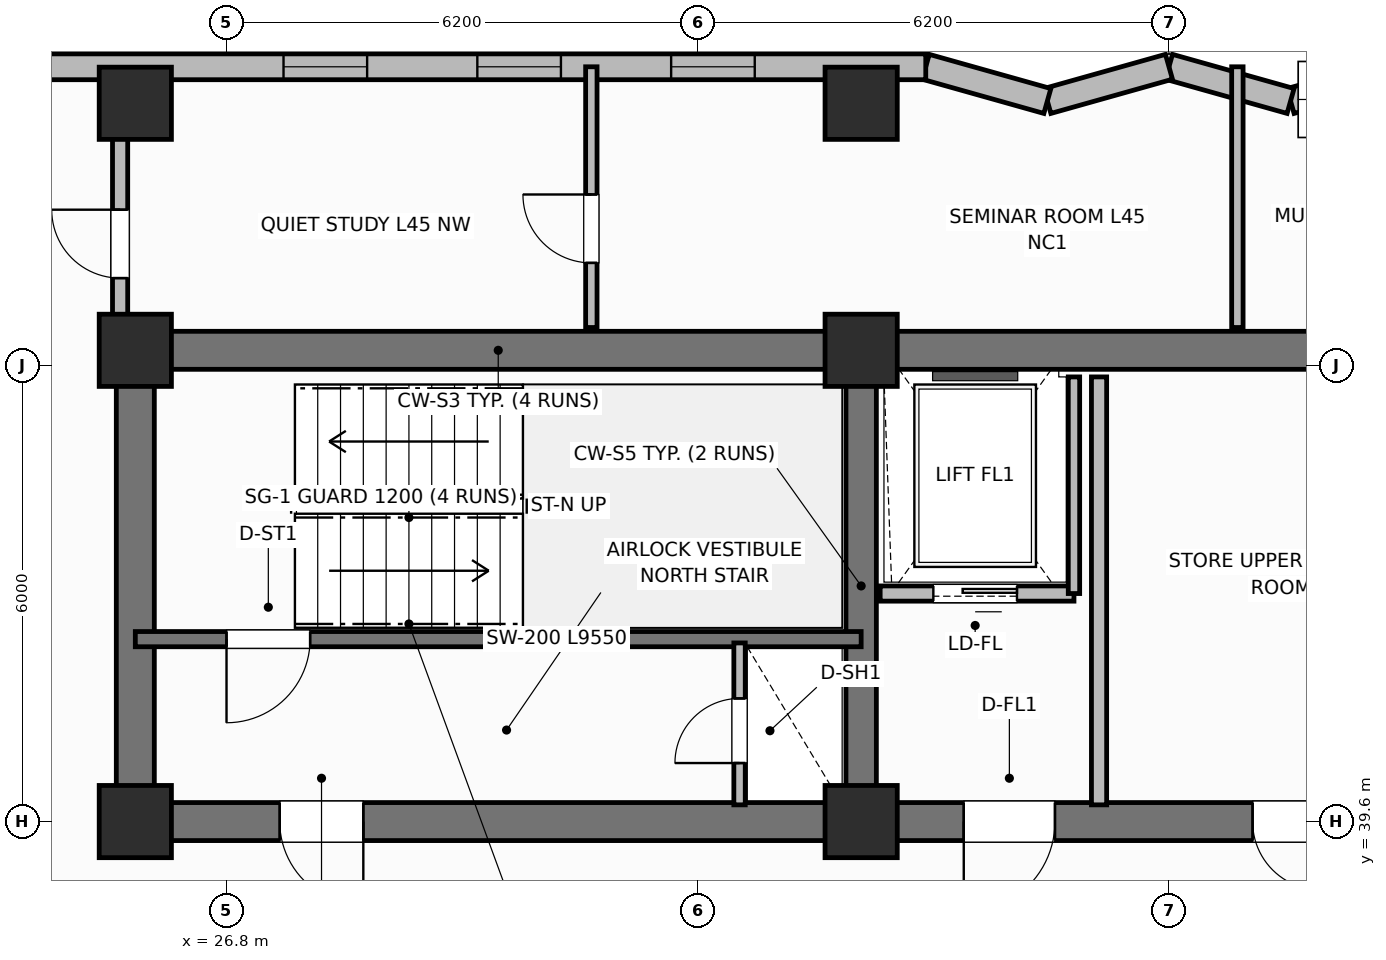
"""IFC4 building model, lengths in metres.
Left out: names, types, materials, properties, quantities, classifications, styles, units other than length and angle.
Written with IfcOpenShell. Run it as: python <this file> out.ifc"""

import sys

from ifc_helpers import new_model, si_unit, direction, frame, frame_2d, origin, origin_2d, place, context, subcontext, project, spatial, rectangle, extrude, element, fill, save


model = new_model("IFC4")
c1 = context("Model", 3, precision=1e-05, world=origin(), true_north=direction((0.0, 1.0)))
c2 = subcontext(c1, "Body", "Model", "MODEL_VIEW")
j1 = project(units=[si_unit("LENGTHUNIT", "METRE"), si_unit("PLANEANGLEUNIT", "RADIAN")], contexts=[c1])
p1 = place(None, origin())
s1 = spatial("IfcSite", under=j1, at=p1, CompositionType="ELEMENT")
p2 = place(p1, origin())
s2 = spatial("IfcBuilding", under=s1, at=p2, CompositionType="ELEMENT")
p3 = place(p2, frame((0.0, 0.0, 181.1)))
s3 = spatial("IfcBuildingStorey", under=s2, at=p3, CompositionType="ELEMENT", Elevation=181.1)
p4 = place(p3, frame((25.6, 45.8, 0.0), z_axis=(0.0, 0.0, 1.0), x_axis=(1.0, 0.0, 0.0)))
e1 = element("IfcWall", 1, at=p4, inside=s3, PredefinedType="SHEAR", context=c2, shape_type="SweptSolid", body=[
    extrude(rectangle(XDim=27.2, YDim=0.5, at=frame_2d((13.6, 0.0))), origin(), (0.0, 0.0, 1.0), 3.7),
])
p5 = place(p3, frame((25.6, 39.85, 0.0), z_axis=(0.0, 0.0, 1.0), x_axis=(0.0, 1.0, 0.0)))
e2 = element("IfcWall", 2, at=p5, inside=s3, PredefinedType="SHEAR", context=c2, shape_type="SweptSolid", body=[
    extrude(rectangle(XDim=5.7, YDim=0.5, at=frame_2d((2.85, 0.0))), origin(), (0.0, 0.0, 1.0), 3.7),
])
p6 = place(p3, frame((52.8, 39.6, 0.0), z_axis=(0.0, 0.0, 1.0), x_axis=(-1.0, 0.0, 0.0)))
e3 = element("IfcWall", 3, at=p6, inside=s3, PredefinedType="SHEAR", context=c2, shape_type="SweptSolid", body=[
    extrude(rectangle(XDim=27.2, YDim=0.5, at=frame_2d((13.6, 0.0))), origin(), (0.0, 0.0, 1.0), 3.7),
])
p7 = place(p6, frame((24.2, 0.0, 0.0)))
e4 = element("IfcOpeningElement", 4, at=p7, cuts=e3, PredefinedType="OPENING", context=c2, shape_type="SweptSolid", body=[
    extrude(rectangle(XDim=1.1, YDim=2.15, at=frame_2d((0.55, 1.075))), frame((0.0, 0.26, 0.0), z_axis=(0.0, -1.0, 0.0), x_axis=(1.0, 0.0, 0.0)), (0.0, 0.0, 1.0), 0.52),
])
p8 = place(p6, frame((15.1, 0.0, 0.0)))
e5 = element("IfcOpeningElement", 5, at=p8, cuts=e3, PredefinedType="OPENING", context=c2, shape_type="SweptSolid", body=[
    extrude(rectangle(XDim=1.2, YDim=2.15, at=frame_2d((0.6, 1.075))), frame((0.0, 0.26, 0.0), z_axis=(0.0, -1.0, 0.0), x_axis=(1.0, 0.0, 0.0)), (0.0, 0.0, 1.0), 0.52),
])
p9 = place(p6, frame((11.6, 0.0, 0.0)))
e6 = element("IfcOpeningElement", 6, at=p9, cuts=e3, PredefinedType="OPENING", context=c2, shape_type="SweptSolid", body=[
    extrude(rectangle(XDim=0.9, YDim=2.1, at=frame_2d((0.45, 1.05))), frame((0.0, 0.26, 0.0), z_axis=(0.0, -1.0, 0.0), x_axis=(1.0, 0.0, 0.0)), (0.0, 0.0, 1.0), 0.52),
])
p10 = place(p6, frame((7.35, 0.0, 0.0)))
e7 = element("IfcOpeningElement", 7, at=p10, cuts=e3, PredefinedType="OPENING", context=c2, shape_type="SweptSolid", body=[
    extrude(rectangle(XDim=0.85, YDim=2.1, at=frame_2d((0.425, 1.05))), frame((0.0, 0.26, 0.0), z_axis=(0.0, -1.0, 0.0), x_axis=(1.0, 0.0, 0.0)), (0.0, 0.0, 1.0), 0.52),
])
p11 = place(p6, frame((3.6, 0.0, 0.0)))
e8 = element("IfcOpeningElement", 8, at=p11, cuts=e3, PredefinedType="OPENING", context=c2, shape_type="SweptSolid", body=[
    extrude(rectangle(XDim=1.0, YDim=2.15, at=frame_2d((0.5, 1.075))), frame((0.0, 0.26, 0.0), z_axis=(0.0, -1.0, 0.0), x_axis=(1.0, 0.0, 0.0)), (0.0, 0.0, 1.0), 0.52),
])
p12 = place(p3, frame((35.15, 39.85, 0.0), z_axis=(0.0, 0.0, 1.0), x_axis=(0.0, 1.0, 0.0)))
e9 = element("IfcWall", 9, at=p12, inside=s3, PredefinedType="SHEAR", context=c2, shape_type="SweptSolid", body=[
    extrude(rectangle(XDim=5.7, YDim=0.4, at=frame_2d((2.85, 0.0))), origin(), (0.0, 0.0, 1.0), 3.7),
])
for number, where, z_axis, x_axis in (
    (10, (25.6, 39.6, 0.0), (0.0, 0.0, 1.0), (1.0, 0.0, 0.0)),
    (11, (25.6, 45.8, 0.0), (0.0, 0.0, 1.0), (1.0, 0.0, 0.0)),
    (12, (35.15, 39.6, 0.0), (0.0, 0.0, 1.0), (1.0, 0.0, 0.0)),
    (13, (35.15, 45.8, 0.0), (0.0, 0.0, 1.0), (1.0, 0.0, 0.0)),
    (14, (25.6, 49.05, 0.0), (0.0, 0.0, 1.0), (1.0, 0.0, 0.0)),
    (15, (35.15, 49.05, 0.0), (0.0, 0.0, 1.0), (1.0, 0.0, 0.0)),
):
    element("IfcColumn", number, at=place(p3, frame(where, z_axis=z_axis, x_axis=x_axis)), inside=s3, PredefinedType="COLUMN", context=c2, shape_type="SweptSolid", body=[
        extrude(rectangle(XDim=0.95, YDim=0.95, at=origin_2d()), origin(), (0.0, 0.0, 1.0), 3.7),
    ])
p13 = place(p3, frame((42.4, 49.53, 0.0), z_axis=(0.0, 0.0, 1.0), x_axis=(-0.962652136636, -0.270741322725, 0.0)))
e16 = element("IfcWall", 16, at=p13, inside=s3, PredefinedType="SOLIDWALL", context=c2, shape_type="SweptSolid", body=[
    extrude(rectangle(XDim=1.662, YDim=0.34, at=frame_2d((0.831, 0.0))), origin(), (0.0, 0.0, 1.0), 2.72),
])
p14 = place(p3, frame((40.8, 49.08, 0.0), z_axis=(0.0, 0.0, 1.0), x_axis=(-0.962662902433, 0.270703040766, 0.0)))
e17 = element("IfcWall", 17, at=p14, inside=s3, PredefinedType="SOLIDWALL", context=c2, shape_type="SweptSolid", body=[
    extrude(rectangle(XDim=1.662, YDim=0.34, at=frame_2d((0.831, 0.0))), origin(), (0.0, 0.0, 1.0), 2.72),
])
p15 = place(p3, frame((39.2, 49.53, 0.0), z_axis=(0.0, 0.0, 1.0), x_axis=(-0.962652136636, -0.270741322725, 0.0)))
e18 = element("IfcWall", 18, at=p15, inside=s3, PredefinedType="SOLIDWALL", context=c2, shape_type="SweptSolid", body=[
    extrude(rectangle(XDim=1.662, YDim=0.34, at=frame_2d((0.831, 0.0))), origin(), (0.0, 0.0, 1.0), 2.72),
])
p16 = place(p3, frame((37.6, 49.08, 0.0), z_axis=(0.0, 0.0, 1.0), x_axis=(-0.962662902433, 0.270703040766, 0.0)))
e19 = element("IfcWall", 19, at=p16, inside=s3, PredefinedType="SOLIDWALL", context=c2, shape_type="SweptSolid", body=[
    extrude(rectangle(XDim=1.662, YDim=0.34, at=frame_2d((0.831, 0.0))), origin(), (0.0, 0.0, 1.0), 2.72),
])
p17 = place(p3, frame((36.0, 49.53, 0.0), z_axis=(0.0, 0.0, 1.0), x_axis=(-1.0, 0.0, 0.0)))
e20 = element("IfcWall", 20, at=p17, inside=s3, PredefinedType="SOLIDWALL", context=c2, shape_type="SweptSolid", body=[
    extrude(rectangle(XDim=15.8, YDim=0.34, at=frame_2d((7.9, 0.0))), origin(), (0.0, 0.0, 1.0), 2.72),
])
p18 = place(p17, frame((2.25, 0.0, 0.95)))
e21 = element("IfcOpeningElement", 21, at=p18, cuts=e20, PredefinedType="OPENING", context=c2, shape_type="SweptSolid", body=[
    extrude(rectangle(XDim=1.1, YDim=1.65, at=frame_2d((0.55, 0.825))), frame((0.0, 0.18, 0.0), z_axis=(0.0, -1.0, 0.0), x_axis=(1.0, 0.0, 0.0)), (0.0, 0.0, 1.0), 0.36),
])
p19 = place(p17, frame((4.8, 0.0, 0.95)))
e22 = element("IfcOpeningElement", 22, at=p19, cuts=e20, PredefinedType="OPENING", context=c2, shape_type="SweptSolid", body=[
    extrude(rectangle(XDim=1.1, YDim=1.65, at=frame_2d((0.55, 0.825))), frame((0.0, 0.18, 0.0), z_axis=(0.0, -1.0, 0.0), x_axis=(1.0, 0.0, 0.0)), (0.0, 0.0, 1.0), 0.36),
])
p20 = place(p17, frame((7.35, 0.0, 0.95)))
e23 = element("IfcOpeningElement", 23, at=p20, cuts=e20, PredefinedType="OPENING", context=c2, shape_type="SweptSolid", body=[
    extrude(rectangle(XDim=1.1, YDim=1.65, at=frame_2d((0.55, 0.825))), frame((0.0, 0.18, 0.0), z_axis=(0.0, -1.0, 0.0), x_axis=(1.0, 0.0, 0.0)), (0.0, 0.0, 1.0), 0.36),
])
p21 = place(p17, frame((13.85, 0.0, 0.95)))
e24 = element("IfcOpeningElement", 24, at=p21, cuts=e20, PredefinedType="OPENING", context=c2, shape_type="SweptSolid", body=[
    extrude(rectangle(XDim=1.1, YDim=1.65, at=frame_2d((0.55, 0.825))), frame((0.0, 0.18, 0.0), z_axis=(0.0, -1.0, 0.0), x_axis=(1.0, 0.0, 0.0)), (0.0, 0.0, 1.0), 0.36),
])
p22 = place(p3, frame((35.15, 42.0, 0.0), z_axis=(0.0, 0.0, 1.0), x_axis=(-1.0, 0.0, 0.0)))
e25 = element("IfcWall", 25, at=p22, inside=s3, PredefinedType="SHEAR", context=c2, shape_type="SweptSolid", body=[
    extrude(rectangle(XDim=9.55, YDim=0.2, at=frame_2d((4.775, 0.0))), origin(), (0.0, 0.0, 1.0), 3.7),
])
p23 = place(p22, frame((7.25, 0.0, 0.0)))
e26 = element("IfcOpeningElement", 26, at=p23, cuts=e25, PredefinedType="OPENING", context=c2, shape_type="SweptSolid", body=[
    extrude(rectangle(XDim=1.1, YDim=2.15, at=frame_2d((0.55, 1.075))), frame((0.0, 0.11, 0.0), z_axis=(0.0, -1.0, 0.0), x_axis=(1.0, 0.0, 0.0)), (0.0, 0.0, 1.0), 0.22),
])
p24 = place(p3, frame((33.55, 39.82, 0.0), z_axis=(0.0, 0.0, 1.0), x_axis=(0.0, 1.0, 0.0)))
e27 = element("IfcWall", 27, at=p24, inside=s3, PredefinedType="PARTITIONING", context=c2, shape_type="SweptSolid", body=[
    extrude(rectangle(XDim=2.13, YDim=0.15, at=frame_2d((1.065, 0.0))), origin(), (0.0, 0.0, 1.0), 2.55),
])
p25 = place(p24, frame((0.55, 0.0, 0.0)))
e28 = element("IfcOpeningElement", 28, at=p25, cuts=e27, PredefinedType="OPENING", context=c2, shape_type="SweptSolid", body=[
    extrude(rectangle(XDim=0.85, YDim=2.05, at=frame_2d((0.425, 1.025))), frame((0.0, 0.085, 0.0), z_axis=(0.0, -1.0, 0.0), x_axis=(1.0, 0.0, 0.0)), (0.0, 0.0, 1.0), 0.17),
])
p26 = place(p3, frame((37.95, 42.6, 0.0), z_axis=(0.0, 0.0, 1.0), x_axis=(-1.0, 0.0, 0.0)))
e29 = element("IfcWall", 29, at=p26, inside=s3, PredefinedType="PARTITIONING", context=c2, shape_type="SweptSolid", body=[
    extrude(rectangle(XDim=2.55, YDim=0.2, at=frame_2d((1.275, 0.0))), origin(), (0.0, 0.0, 1.0), 2.32),
])
p27 = place(p26, frame((0.75, 0.0, 0.0)))
e30 = element("IfcOpeningElement", 30, at=p27, cuts=e29, PredefinedType="OPENING", context=c2, shape_type="SweptSolid", body=[
    extrude(rectangle(XDim=1.1, YDim=2.15, at=frame_2d((0.55, 1.075))), frame((0.0, 0.11, 0.0), z_axis=(0.0, -1.0, 0.0), x_axis=(1.0, 0.0, 0.0)), (0.0, 0.0, 1.0), 0.22),
])
p28 = place(p3, frame((37.95, 42.6, 0.0), z_axis=(0.0, 0.0, 1.0), x_axis=(0.0, 1.0, 0.0)))
e31 = element("IfcWall", 31, at=p28, inside=s3, PredefinedType="PARTITIONING", context=c2, shape_type="SweptSolid", body=[
    extrude(rectangle(XDim=2.85, YDim=0.15, at=frame_2d((1.425, 0.0))), origin(), (0.0, 0.0, 1.0), 2.55),
])
p29 = place(p3, frame((38.28, 39.82, 0.0), z_axis=(0.0, 0.0, 1.0), x_axis=(0.0, 1.0, 0.0)))
e32 = element("IfcWall", 32, at=p29, inside=s3, PredefinedType="PARTITIONING", context=c2, shape_type="SweptSolid", body=[
    extrude(rectangle(XDim=5.63, YDim=0.2, at=frame_2d((2.815, 0.0))), origin(), (0.0, 0.0, 1.0), 2.55),
])
p30 = place(p3, frame((31.6, 46.1, 0.0), z_axis=(0.0, 0.0, 1.0), x_axis=(0.0, 1.0, 0.0)))
e33 = element("IfcWall", 33, at=p30, inside=s3, PredefinedType="PARTITIONING", context=c2, shape_type="SweptSolid", body=[
    extrude(rectangle(XDim=3.43, YDim=0.15, at=frame_2d((1.715, 0.0))), origin(), (0.0, 0.0, 1.0), 2.55),
])
p31 = place(p30, frame((0.85, 0.0, 0.0)))
e34 = element("IfcOpeningElement", 34, at=p31, cuts=e33, PredefinedType="OPENING", context=c2, shape_type="SweptSolid", body=[
    extrude(rectangle(XDim=0.9, YDim=2.1, at=frame_2d((0.45, 1.05))), frame((0.0, 0.085, 0.0), z_axis=(0.0, -1.0, 0.0), x_axis=(1.0, 0.0, 0.0)), (0.0, 0.0, 1.0), 0.17),
])
p32 = place(p3, frame((40.1, 46.1, 0.0), z_axis=(0.0, 0.0, 1.0), x_axis=(0.0, 1.0, 0.0)))
e35 = element("IfcWall", 35, at=p32, inside=s3, PredefinedType="PARTITIONING", context=c2, shape_type="SweptSolid", body=[
    extrude(rectangle(XDim=3.43, YDim=0.15, at=frame_2d((1.715, 0.0))), origin(), (0.0, 0.0, 1.0), 2.55),
])
p33 = place(p3, frame((25.4, 46.1, 0.0), z_axis=(0.0, 0.0, 1.0), x_axis=(0.0, 1.0, 0.0)))
e36 = element("IfcWall", 36, at=p33, inside=s3, PredefinedType="PARTITIONING", context=c2, shape_type="SweptSolid", body=[
    extrude(rectangle(XDim=2.68, YDim=0.2, at=frame_2d((1.34, 0.0))), origin(), (0.0, 0.0, 1.0), 2.55),
])
p34 = place(p33, frame((0.65, 0.0, 0.0)))
e37 = element("IfcOpeningElement", 37, at=p34, cuts=e36, PredefinedType="OPENING", context=c2, shape_type="SweptSolid", body=[
    extrude(rectangle(XDim=0.9, YDim=2.1, at=frame_2d((0.45, 1.05))), frame((0.0, 0.11, 0.0), z_axis=(0.0, -1.0, 0.0), x_axis=(1.0, 0.0, 0.0)), (0.0, 0.0, 1.0), 0.22),
])
p35 = place(p18, origin())
e38 = element("IfcWindow", 38, at=p35, inside=s3, PartitioningType="SINGLE_PANEL", PredefinedType="WINDOW", context=c2, shape_type="SweptSolid", body=[
    extrude(rectangle(XDim=1.1, YDim=1.65, at=frame_2d((0.55, 0.825))), frame((0.0, 0.03, 0.0), z_axis=(0.0, -1.0, 0.0), x_axis=(1.0, 0.0, 0.0)), (0.0, 0.0, 1.0), 0.06),
])
fill(e21, e38)
p36 = place(p19, origin())
e39 = element("IfcWindow", 39, at=p36, inside=s3, PartitioningType="SINGLE_PANEL", PredefinedType="WINDOW", context=c2, shape_type="SweptSolid", body=[
    extrude(rectangle(XDim=1.1, YDim=1.65, at=frame_2d((0.55, 0.825))), frame((0.0, 0.03, 0.0), z_axis=(0.0, -1.0, 0.0), x_axis=(1.0, 0.0, 0.0)), (0.0, 0.0, 1.0), 0.06),
])
fill(e22, e39)
p37 = place(p20, origin())
e40 = element("IfcWindow", 40, at=p37, inside=s3, PartitioningType="SINGLE_PANEL", PredefinedType="WINDOW", context=c2, shape_type="SweptSolid", body=[
    extrude(rectangle(XDim=1.1, YDim=1.65, at=frame_2d((0.55, 0.825))), frame((0.0, 0.03, 0.0), z_axis=(0.0, -1.0, 0.0), x_axis=(1.0, 0.0, 0.0)), (0.0, 0.0, 1.0), 0.06),
])
fill(e23, e40)
p38 = place(p23, origin())
e41 = element("IfcDoor", 41, at=p38, inside=s3, OperationType="SINGLE_SWING_RIGHT", PredefinedType="DOOR", context=c2, shape_type="SweptSolid", body=[
    extrude(rectangle(XDim=1.1, YDim=2.15, at=frame_2d((0.55, 1.075))), frame((0.0, 0.025, 0.0), z_axis=(0.0, -1.0, 0.0), x_axis=(1.0, 0.0, 0.0)), (0.0, 0.0, 1.0), 0.05),
])
fill(e26, e41)
p39 = place(p25, origin())
e42 = element("IfcDoor", 42, at=p39, inside=s3, OperationType="SINGLE_SWING_LEFT", PredefinedType="TRAPDOOR", context=c2, shape_type="SweptSolid", body=[
    extrude(rectangle(XDim=0.85, YDim=2.05, at=frame_2d((0.425, 1.025))), frame((0.0, 0.025, 0.0), z_axis=(0.0, -1.0, 0.0), x_axis=(1.0, 0.0, 0.0)), (0.0, 0.0, 1.0), 0.05),
])
fill(e28, e42)
p40 = place(p27, origin())
e43 = element("IfcDoor", 43, at=p40, inside=s3, OperationType="SLIDING_TO_LEFT", PredefinedType="DOOR", context=c2, shape_type="SweptSolid", body=[
    extrude(rectangle(XDim=1.1, YDim=2.15, at=frame_2d((0.55, 1.075))), frame((0.0, 0.025, 0.0), z_axis=(0.0, -1.0, 0.0), x_axis=(1.0, 0.0, 0.0)), (0.0, 0.0, 1.0), 0.05),
])
fill(e30, e43)
p41 = place(p31, origin())
e44 = element("IfcDoor", 44, at=p41, inside=s3, OperationType="SINGLE_SWING_RIGHT", PredefinedType="DOOR", context=c2, shape_type="SweptSolid", body=[
    extrude(rectangle(XDim=0.9, YDim=2.1, at=frame_2d((0.45, 1.05))), frame((0.0, 0.025, 0.0), z_axis=(0.0, -1.0, 0.0), x_axis=(1.0, 0.0, 0.0)), (0.0, 0.0, 1.0), 0.05),
])
fill(e34, e44)
p42 = place(p34, origin())
e45 = element("IfcDoor", 45, at=p42, inside=s3, OperationType="SINGLE_SWING_RIGHT", PredefinedType="DOOR", context=c2, shape_type="SweptSolid", body=[
    extrude(rectangle(XDim=0.9, YDim=2.1, at=frame_2d((0.45, 1.05))), frame((0.0, 0.025, 0.0), z_axis=(0.0, -1.0, 0.0), x_axis=(1.0, 0.0, 0.0)), (0.0, 0.0, 1.0), 0.05),
])
fill(e37, e45)
p43 = place(p7, origin())
e46 = element("IfcDoor", 46, at=p43, inside=s3, OperationType="SINGLE_SWING_LEFT", PredefinedType="DOOR", context=c2, shape_type="SweptSolid", body=[
    extrude(rectangle(XDim=1.1, YDim=2.15, at=frame_2d((0.55, 1.075))), frame((0.0, 0.025, 0.0), z_axis=(0.0, -1.0, 0.0), x_axis=(1.0, 0.0, 0.0)), (0.0, 0.0, 1.0), 0.05),
])
fill(e4, e46)
p44 = place(p8, origin())
e47 = element("IfcDoor", 47, at=p44, inside=s3, OperationType="SINGLE_SWING_RIGHT", PredefinedType="DOOR", context=c2, shape_type="SweptSolid", body=[
    extrude(rectangle(XDim=1.2, YDim=2.15, at=frame_2d((0.6, 1.075))), frame((0.0, 0.025, 0.0), z_axis=(0.0, -1.0, 0.0), x_axis=(1.0, 0.0, 0.0)), (0.0, 0.0, 1.0), 0.05),
])
fill(e5, e47)
p45 = place(p9, origin())
e48 = element("IfcDoor", 48, at=p45, inside=s3, OperationType="SINGLE_SWING_LEFT", PredefinedType="DOOR", context=c2, shape_type="SweptSolid", body=[
    extrude(rectangle(XDim=0.9, YDim=2.1, at=frame_2d((0.45, 1.05))), frame((0.0, 0.025, 0.0), z_axis=(0.0, -1.0, 0.0), x_axis=(1.0, 0.0, 0.0)), (0.0, 0.0, 1.0), 0.05),
])
fill(e6, e48)
save(model, sys.argv[1])
